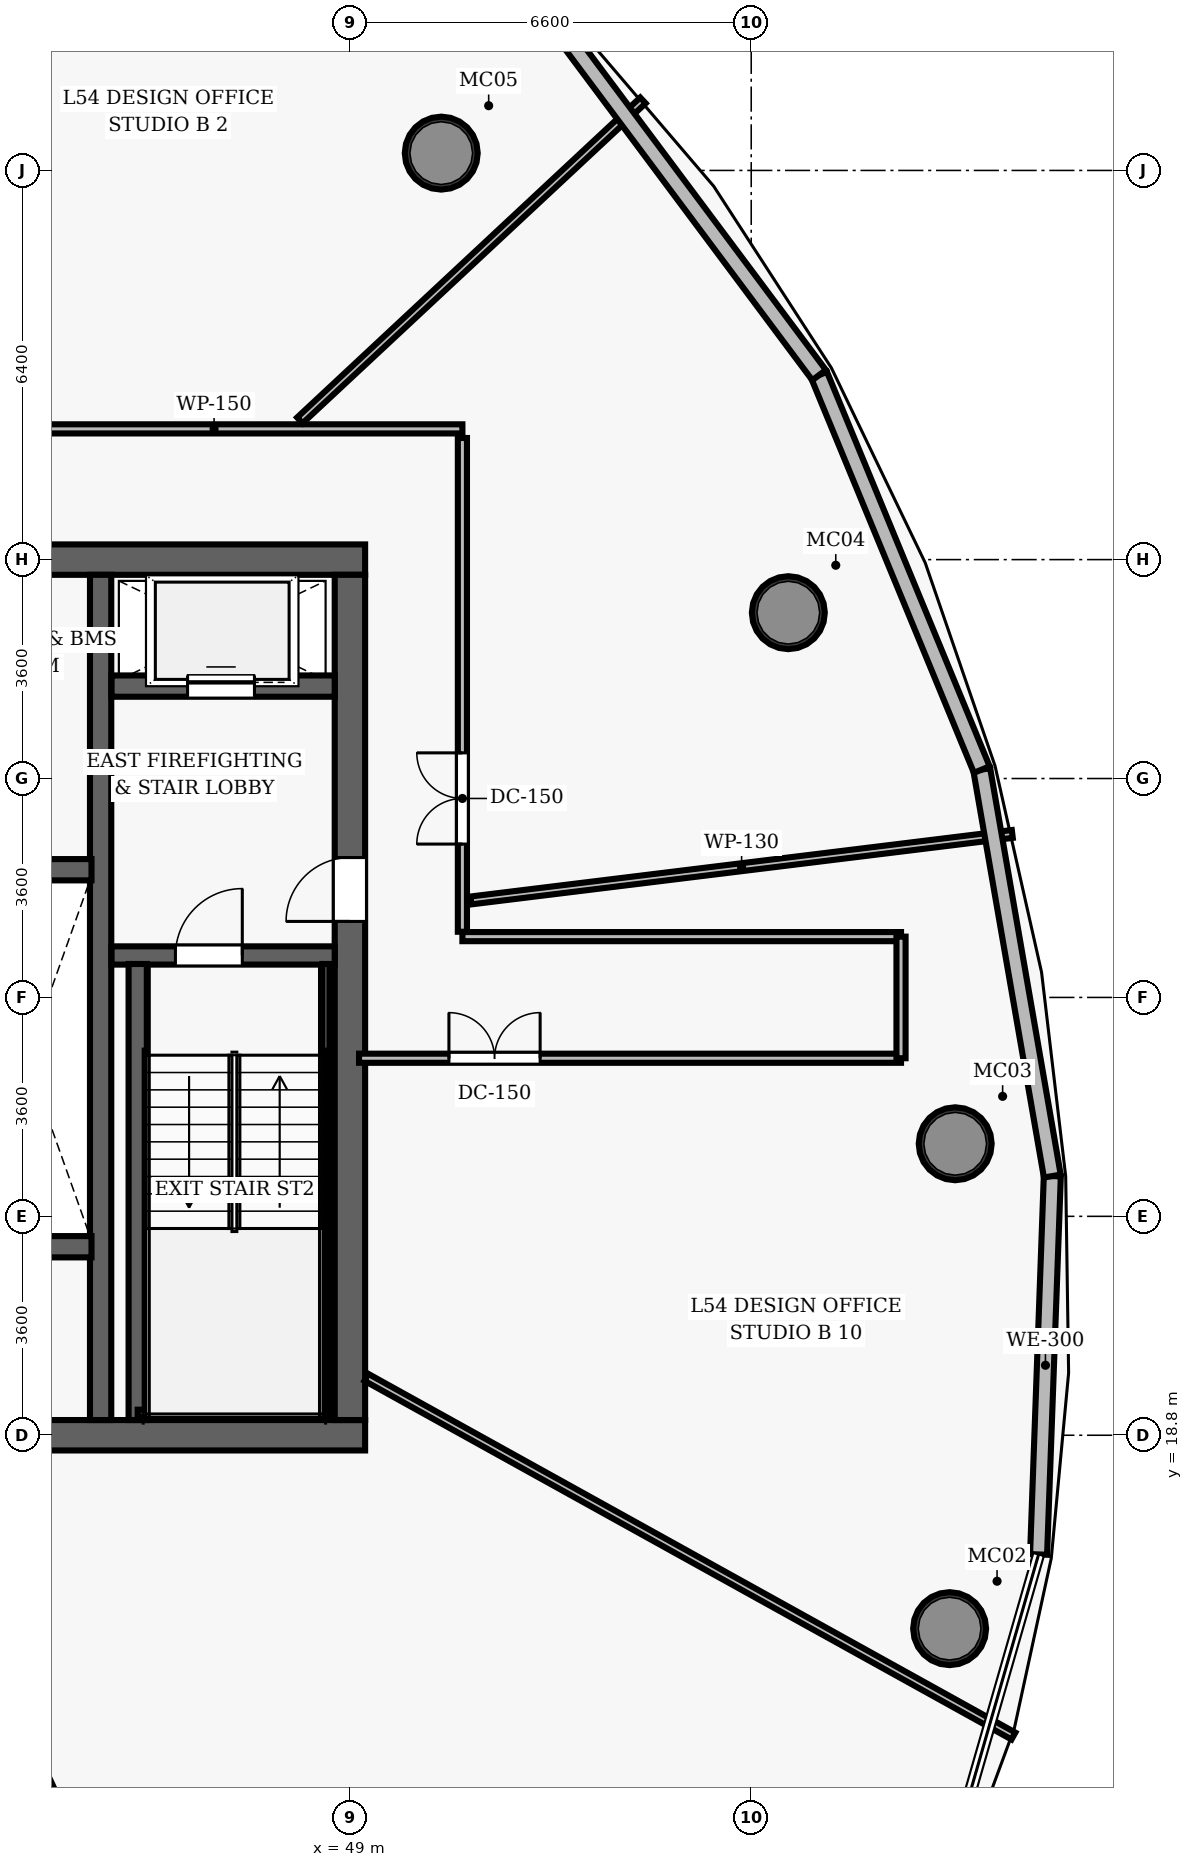
"""IFC4 building model, lengths in metres.
Left out: names, types, materials, properties, quantities, classifications, styles, units other than length and angle.
Written with IfcOpenShell. Run it as: python <this file> out.ifc"""

import sys

from ifc_helpers import new_model, si_unit, direction, frame, frame_2d, origin, origin_2d, place, context, subcontext, project, spatial, rectangle, hollow_circle, extrude, element, fill, save


model = new_model("IFC4")
c1 = context("Model", 3, precision=1e-05, world=origin(), true_north=direction((0.0, 1.0)))
c2 = subcontext(c1, "Body", "Model", "MODEL_VIEW")
j1 = project(units=[si_unit("LENGTHUNIT", "METRE"), si_unit("PLANEANGLEUNIT", "RADIAN")], contexts=[c1])
p1 = place(None, origin())
s1 = spatial("IfcSite", under=j1, at=p1, CompositionType="ELEMENT")
p2 = place(p1, origin())
s2 = spatial("IfcBuilding", under=s1, at=p2, CompositionType="ELEMENT")
p3 = place(p2, frame((0.0, 0.0, 213.55)))
s3 = spatial("IfcBuildingStorey", under=s2, at=p3, CompositionType="ELEMENT", Elevation=213.55)
p4 = place(p3, frame((26.75, 18.8, 0.0), z_axis=(0.0, 0.0, 1.0), x_axis=(1.0, 0.0, 0.0)))
e1 = element("IfcWall", 1, at=p4, inside=s3, PredefinedType="SHEAR", context=c2, shape_type="SweptSolid", body=[
    extrude(rectangle(XDim=22.5, YDim=0.5, at=frame_2d((11.25, 0.0))), origin(), (0.0, 0.0, 1.0), 3.85),
])
p5 = place(p4, frame((14.47, 0.0, 0.0)))
e2 = element("IfcOpeningElement", 2, at=p5, cuts=e1, PredefinedType="OPENING", context=c2, shape_type="SweptSolid", body=[
    extrude(rectangle(XDim=1.05, YDim=2.15, at=frame_2d((0.525, 1.075))), frame((0.0, 0.26, 0.0), z_axis=(0.0, -1.0, 0.0), x_axis=(1.0, 0.0, 0.0)), (0.0, 0.0, 1.0), 0.52),
])
p6 = place(p3, frame((26.75, 33.2, 0.0), z_axis=(0.0, 0.0, 1.0), x_axis=(1.0, 0.0, 0.0)))
e3 = element("IfcWall", 3, at=p6, inside=s3, PredefinedType="SHEAR", context=c2, shape_type="SweptSolid", body=[
    extrude(rectangle(XDim=22.5, YDim=0.5, at=frame_2d((11.25, 0.0))), origin(), (0.0, 0.0, 1.0), 3.85),
])
p7 = place(p6, frame((4.57, 0.0, 0.0)))
e4 = element("IfcOpeningElement", 4, at=p7, cuts=e3, PredefinedType="OPENING", context=c2, shape_type="SweptSolid", body=[
    extrude(rectangle(XDim=1.05, YDim=2.15, at=frame_2d((0.525, 1.075))), frame((0.0, 0.26, 0.0), z_axis=(0.0, -1.0, 0.0), x_axis=(1.0, 0.0, 0.0)), (0.0, 0.0, 1.0), 0.52),
])
p8 = place(p6, frame((14.47, 0.0, 0.0)))
e5 = element("IfcOpeningElement", 5, at=p8, cuts=e3, PredefinedType="OPENING", context=c2, shape_type="SweptSolid", body=[
    extrude(rectangle(XDim=1.05, YDim=2.15, at=frame_2d((0.525, 1.075))), frame((0.0, 0.26, 0.0), z_axis=(0.0, -1.0, 0.0), x_axis=(1.0, 0.0, 0.0)), (0.0, 0.0, 1.0), 0.52),
])
p9 = place(p3, frame((49.0, 19.05, 0.0), z_axis=(0.0, 0.0, 1.0), x_axis=(0.0, 1.0, 0.0)))
e6 = element("IfcWall", 6, at=p9, inside=s3, PredefinedType="SHEAR", context=c2, shape_type="SweptSolid", body=[
    extrude(rectangle(XDim=13.9, YDim=0.5, at=frame_2d((6.95, 0.0))), origin(), (0.0, 0.0, 1.0), 3.85),
])
p10 = place(p9, frame((8.2, 0.0, 0.0)))
e7 = element("IfcOpeningElement", 7, at=p10, cuts=e6, PredefinedType="OPENING", context=c2, shape_type="SweptSolid", body=[
    extrude(rectangle(XDim=1.05, YDim=2.15, at=frame_2d((0.525, 1.075))), frame((0.0, 0.26, 0.0), z_axis=(0.0, -1.0, 0.0), x_axis=(1.0, 0.0, 0.0)), (0.0, 0.0, 1.0), 0.52),
])
p11 = place(p3, frame((44.9, 19.05, 0.0), z_axis=(0.0, 0.0, 1.0), x_axis=(0.0, 1.0, 0.0)))
e8 = element("IfcWall", 8, at=p11, inside=s3, PredefinedType="SHEAR", context=c2, shape_type="SweptSolid", body=[
    extrude(rectangle(XDim=13.9, YDim=0.35, at=frame_2d((6.95, 0.0))), origin(), (0.0, 0.0, 1.0), 3.85),
])
for number, where, z_axis, x_axis in (
    (9, (58.863, 15.619, 0.0), (0.0, 0.0, 1.0), (1.0, 0.0, 0.0)),
    (10, (58.955, 23.594, 0.0), (0.0, 0.0, 1.0), (1.0, 0.0, 0.0)),
    (11, (56.21, 32.327, 0.0), (0.0, 0.0, 1.0), (1.0, 0.0, 0.0)),
    (12, (50.502, 39.885, 0.0), (0.0, 0.0, 1.0), (1.0, 0.0, 0.0)),
):
    element("IfcColumn", number, at=place(p3, frame(where, z_axis=z_axis, x_axis=x_axis)), inside=s3, PredefinedType="COLUMN", context=c2, shape_type="SweptSolid", body=[
        extrude(hollow_circle(Radius=0.6, WallThickness=0.05, at=origin_2d()), origin(), (0.0, 0.0, 1.0), 3.85),
    ])
p12 = place(p3, frame((45.08, 26.69, 0.0), z_axis=(0.0, 0.0, 1.0), x_axis=(1.0, 0.0, 0.0)))
e13 = element("IfcWall", 13, at=p12, inside=s3, PredefinedType="SHEAR", context=c2, shape_type="SweptSolid", body=[
    extrude(rectangle(XDim=3.67, YDim=0.3, at=frame_2d((1.835, 0.0))), origin(), (0.0, 0.0, 1.0), 3.85),
])
p13 = place(p12, frame((1.05, 0.0, 0.0)))
e14 = element("IfcOpeningElement", 14, at=p13, cuts=e13, PredefinedType="OPENING", context=c2, shape_type="SweptSolid", body=[
    extrude(rectangle(XDim=1.1, YDim=2.15, at=frame_2d((0.55, 1.075))), frame((0.0, 0.16, 0.0), z_axis=(0.0, -1.0, 0.0), x_axis=(1.0, 0.0, 0.0)), (0.0, 0.0, 1.0), 0.32),
])
p14 = place(p3, frame((45.51, 19.05, 0.0), z_axis=(0.0, 0.0, 1.0), x_axis=(0.0, 1.0, 0.0)))
e15 = element("IfcWall", 15, at=p14, inside=s3, PredefinedType="SHEAR", context=c2, shape_type="SweptSolid", body=[
    extrude(rectangle(XDim=7.5, YDim=0.3, at=frame_2d((3.75, 0.0))), origin(), (0.0, 0.0, 1.0), 3.85),
])
p15 = place(p3, frame((48.605, 19.1, 0.0), z_axis=(0.0, 0.0, 1.0), x_axis=(0.0, 1.0, 0.0)))
e16 = element("IfcWall", 16, at=p15, inside=s3, PredefinedType="SHEAR", context=c2, shape_type="SweptSolid", body=[
    extrude(rectangle(XDim=7.45, YDim=0.12, at=frame_2d((3.725, 0.0))), origin(), (0.0, 0.0, 1.0), 3.85),
])
p16 = place(p3, frame((45.51, 19.16, 0.0), z_axis=(0.0, 0.0, 1.0), x_axis=(1.0, 0.0, 0.0)))
e17 = element("IfcWall", 17, at=p16, inside=s3, PredefinedType="SHEAR", context=c2, shape_type="SweptSolid", body=[
    extrude(rectangle(XDim=3.095, YDim=0.12, at=frame_2d((1.547, 0.0))), origin(), (0.0, 0.0, 1.0), 3.85),
])
p17 = place(p3, frame((45.08, 31.12, 0.0), z_axis=(0.0, 0.0, 1.0), x_axis=(1.0, 0.0, 0.0)))
e18 = element("IfcWall", 18, at=p17, inside=s3, PredefinedType="SHEAR", context=c2, shape_type="SweptSolid", body=[
    extrude(rectangle(XDim=3.67, YDim=0.35, at=frame_2d((1.835, 0.0))), origin(), (0.0, 0.0, 1.0), 3.035),
])
p18 = place(p17, frame((1.25, 0.0, 0.0)))
e19 = element("IfcOpeningElement", 19, at=p18, cuts=e18, PredefinedType="OPENING", context=c2, shape_type="SweptSolid", body=[
    extrude(rectangle(XDim=1.1, YDim=2.15, at=frame_2d((0.55, 1.075))), frame((0.0, 0.185, 0.0), z_axis=(0.0, -1.0, 0.0), x_axis=(1.0, 0.0, 0.0)), (0.0, 0.0, 1.0), 0.37),
])
for number, where, z_axis, x_axis in (
    (20, (42.72, 21.9, 0.0), (0.0, 0.0, 1.0), (1.0, 0.0, 0.0)),
    (21, (42.72, 28.1, 0.0), (0.0, 0.0, 1.0), (1.0, 0.0, 0.0)),
):
    element("IfcWall", number, at=place(p3, frame(where, z_axis=z_axis, x_axis=x_axis)), inside=s3, PredefinedType="SHEAR", context=c2, shape_type="SweptSolid", body=[
        extrude(rectangle(XDim=2.03, YDim=0.35, at=frame_2d((1.015, 0.0))), origin(), (0.0, 0.0, 1.0), 3.035),
    ])
p19 = place(p3, frame((24.85, 35.35, 0.0), z_axis=(0.0, 0.0, 1.0), x_axis=(1.0, 0.0, 0.0)))
e22 = element("IfcWall", 22, at=p19, inside=s3, PredefinedType="PARTITIONING", context=c2, shape_type="SweptSolid", body=[
    extrude(rectangle(XDim=26.0, YDim=0.15, at=frame_2d((13.0, 0.0))), origin(), (0.0, 0.0, 1.0), 3.035),
])
p20 = place(p19, frame((16.182, 0.0, 0.0)))
e23 = element("IfcOpeningElement", 23, at=p20, cuts=e22, PredefinedType="OPENING", context=c2, shape_type="SweptSolid", body=[
    extrude(rectangle(XDim=1.5, YDim=2.2, at=frame_2d((0.75, 1.1))), frame((0.0, 0.085, 0.0), z_axis=(0.0, -1.0, 0.0), x_axis=(1.0, 0.0, 0.0)), (0.0, 0.0, 1.0), 0.17),
])
p21 = place(p19, frame((10.36, 0.0, 0.0)))
e24 = element("IfcOpeningElement", 24, at=p21, cuts=e22, PredefinedType="OPENING", context=c2, shape_type="SweptSolid", body=[
    extrude(rectangle(XDim=0.95, YDim=2.15, at=frame_2d((0.475, 1.075))), frame((0.0, 0.085, 0.0), z_axis=(0.0, -1.0, 0.0), x_axis=(1.0, 0.0, 0.0)), (0.0, 0.0, 1.0), 0.17),
])
p22 = place(p19, frame((6.298, 0.0, 0.0)))
e25 = element("IfcOpeningElement", 25, at=p22, cuts=e22, PredefinedType="OPENING", context=c2, shape_type="SweptSolid", body=[
    extrude(rectangle(XDim=0.95, YDim=2.15, at=frame_2d((0.475, 1.075))), frame((0.0, 0.085, 0.0), z_axis=(0.0, -1.0, 0.0), x_axis=(1.0, 0.0, 0.0)), (0.0, 0.0, 1.0), 0.17),
])
p23 = place(p3, frame((50.85, 27.08, 0.0), z_axis=(0.0, 0.0, 1.0), x_axis=(0.0, 1.0, 0.0)))
e26 = element("IfcWall", 26, at=p23, inside=s3, PredefinedType="PARTITIONING", context=c2, shape_type="SweptSolid", body=[
    extrude(rectangle(XDim=8.12, YDim=0.15, at=frame_2d((4.06, 0.0))), origin(), (0.0, 0.0, 1.0), 3.035),
])
p24 = place(p23, frame((1.442, 0.0, 0.0)))
e27 = element("IfcOpeningElement", 27, at=p24, cuts=e26, PredefinedType="OPENING", context=c2, shape_type="SweptSolid", body=[
    extrude(rectangle(XDim=1.5, YDim=2.2, at=frame_2d((0.75, 1.1))), frame((0.0, 0.085, 0.0), z_axis=(0.0, -1.0, 0.0), x_axis=(1.0, 0.0, 0.0)), (0.0, 0.0, 1.0), 0.17),
])
p25 = place(p3, frame((50.85, 27.0, 0.0), z_axis=(0.0, 0.0, 1.0), x_axis=(1.0, 0.0, 0.0)))
e28 = element("IfcWall", 28, at=p25, inside=s3, PredefinedType="PARTITIONING", context=c2, shape_type="SweptSolid", body=[
    extrude(rectangle(XDim=7.214, YDim=0.15, at=frame_2d((3.607, 0.0))), origin(), (0.0, 0.0, 1.0), 3.035),
])
p26 = place(p3, frame((49.15, 25.0, 0.0), z_axis=(0.0, 0.0, 1.0), x_axis=(1.0, 0.0, 0.0)))
e29 = element("IfcWall", 29, at=p26, inside=s3, PredefinedType="PARTITIONING", context=c2, shape_type="SweptSolid", body=[
    extrude(rectangle(XDim=8.914, YDim=0.15, at=frame_2d((4.457, 0.0))), origin(), (0.0, 0.0, 1.0), 3.035),
])
p27 = place(p26, frame((1.479, 0.0, 0.0)))
e30 = element("IfcOpeningElement", 30, at=p27, cuts=e29, PredefinedType="OPENING", context=c2, shape_type="SweptSolid", body=[
    extrude(rectangle(XDim=1.5, YDim=2.2, at=frame_2d((0.75, 1.1))), frame((0.0, 0.085, 0.0), z_axis=(0.0, -1.0, 0.0), x_axis=(1.0, 0.0, 0.0)), (0.0, 0.0, 1.0), 0.17),
])
p28 = place(p3, frame((58.064, 25.0, 0.0), z_axis=(0.0, 0.0, 1.0), x_axis=(0.0, 1.0, 0.0)))
e31 = element("IfcWall", 31, at=p28, inside=s3, PredefinedType="PARTITIONING", context=c2, shape_type="SweptSolid", body=[
    extrude(rectangle(XDim=2.0, YDim=0.15, at=frame_2d((1.0, 0.0))), origin(), (0.0, 0.0, 1.0), 3.035),
])
p29 = place(p3, frame((50.99, 27.595, 0.0), z_axis=(0.0, 0.0, 1.0), x_axis=(0.992545996706, 0.121870605244, 0.0)))
e32 = element("IfcWall", 32, at=p29, inside=s3, PredefinedType="PARTITIONING", context=c2, shape_type="SweptSolid", body=[
    extrude(rectangle(XDim=8.971, YDim=0.13, at=frame_2d((4.485, 0.0))), origin(), (0.0, 0.0, 1.0), 3.035),
])
p30 = place(p3, frame((48.177, 35.49, 0.0), z_axis=(0.0, 0.0, 1.0), x_axis=(0.731343539184, 0.682009257777, 0.0)))
e33 = element("IfcWall", 33, at=p30, inside=s3, PredefinedType="PARTITIONING", context=c2, shape_type="SweptSolid", body=[
    extrude(rectangle(XDim=7.715, YDim=0.13, at=frame_2d((3.857, 0.0))), origin(), (0.0, 0.0, 1.0), 3.035),
])
p31 = place(p3, frame((42.425, 16.51, 0.0), z_axis=(0.0, 0.0, 1.0), x_axis=(0.422623131255, -0.906305516329, 0.0)))
e34 = element("IfcWall", 34, at=p31, inside=s3, PredefinedType="PARTITIONING", context=c2, shape_type="SweptSolid", body=[
    extrude(rectangle(XDim=14.266, YDim=0.13, at=frame_2d((7.133, 0.0))), origin(), (0.0, 0.0, 1.0), 3.035),
])
p32 = place(p3, frame((49.27, 19.753, 0.0), z_axis=(0.0, 0.0, 1.0), x_axis=(0.874618736084, -0.484811372072, 0.0)))
e35 = element("IfcWall", 35, at=p32, inside=s3, PredefinedType="PARTITIONING", context=c2, shape_type="SweptSolid", body=[
    extrude(rectangle(XDim=12.168, YDim=0.13, at=frame_2d((6.084, 0.0))), origin(), (0.0, 0.0, 1.0), 3.035),
])
p33 = place(p3, frame((60.552, 23.062, 0.0), z_axis=(0.0, 0.0, 1.0), x_axis=(-0.036269133446, -0.999342058536, 0.0)))
e36 = element("IfcWall", 36, at=p33, inside=s3, PredefinedType="SOLIDWALL", context=c2, shape_type="SweptSolid", body=[
    extrude(rectangle(XDim=6.227, YDim=0.28, at=frame_2d((3.113, 0.0))), origin(), (0.0, 0.0, 1.0), 3.62),
])
p34 = place(p3, frame((59.392, 29.747, 0.0), z_axis=(0.0, 0.0, 1.0), x_axis=(0.171035922685, -0.985264793419, 0.0)))
e37 = element("IfcWall", 37, at=p34, inside=s3, PredefinedType="SOLIDWALL", context=c2, shape_type="SweptSolid", body=[
    extrude(rectangle(XDim=6.784, YDim=0.28, at=frame_2d((3.392, 0.0))), origin(), (0.0, 0.0, 1.0), 3.62),
])
p35 = place(p3, frame((56.716, 36.234, 0.0), z_axis=(0.0, 0.0, 1.0), x_axis=(0.381230949434, -0.924479833849, 0.0)))
e38 = element("IfcWall", 38, at=p35, inside=s3, PredefinedType="SOLIDWALL", context=c2, shape_type="SweptSolid", body=[
    extrude(rectangle(XDim=7.018, YDim=0.28, at=frame_2d((3.509, 0.0))), origin(), (0.0, 0.0, 1.0), 3.62),
])
p36 = place(p3, frame((52.5, 41.879, 0.0), z_axis=(0.0, 0.0, 1.0), x_axis=(0.598368729924, -0.801220857847, 0.0)))
e39 = element("IfcWall", 39, at=p36, inside=s3, PredefinedType="SOLIDWALL", context=c2, shape_type="SweptSolid", body=[
    extrude(rectangle(XDim=7.045, YDim=0.28, at=frame_2d((3.523, 0.0))), origin(), (0.0, 0.0, 1.0), 3.62),
])
p37 = place(p13, origin())
e40 = element("IfcDoor", 40, at=p37, inside=s3, OperationType="SINGLE_SWING_RIGHT", PredefinedType="DOOR", context=c2, shape_type="SweptSolid", body=[
    extrude(rectangle(XDim=1.1, YDim=2.15, at=frame_2d((0.55, 1.075))), frame((0.0, 0.025, 0.0), z_axis=(0.0, -1.0, 0.0), x_axis=(1.0, 0.0, 0.0)), (0.0, 0.0, 1.0), 0.05),
])
fill(e14, e40)
p38 = place(p10, origin())
e41 = element("IfcDoor", 41, at=p38, inside=s3, OperationType="SINGLE_SWING_LEFT", PredefinedType="DOOR", context=c2, shape_type="SweptSolid", body=[
    extrude(rectangle(XDim=1.05, YDim=2.15, at=frame_2d((0.525, 1.075))), frame((0.0, 0.025, 0.0), z_axis=(0.0, -1.0, 0.0), x_axis=(1.0, 0.0, 0.0)), (0.0, 0.0, 1.0), 0.05),
])
fill(e7, e41)
p39 = place(p24, origin())
e42 = element("IfcDoor", 42, at=p39, inside=s3, OperationType="DOUBLE_DOOR_SINGLE_SWING", PredefinedType="DOOR", context=c2, shape_type="SweptSolid", body=[
    extrude(rectangle(XDim=1.5, YDim=2.2, at=frame_2d((0.75, 1.1))), frame((0.0, 0.025, 0.0), z_axis=(0.0, -1.0, 0.0), x_axis=(1.0, 0.0, 0.0)), (0.0, 0.0, 1.0), 0.05),
])
fill(e27, e42)
p40 = place(p27, origin())
e43 = element("IfcDoor", 43, at=p40, inside=s3, OperationType="DOUBLE_DOOR_SINGLE_SWING", PredefinedType="DOOR", context=c2, shape_type="SweptSolid", body=[
    extrude(rectangle(XDim=1.5, YDim=2.2, at=frame_2d((0.75, 1.1))), frame((0.0, 0.025, 0.0), z_axis=(0.0, -1.0, 0.0), x_axis=(1.0, 0.0, 0.0)), (0.0, 0.0, 1.0), 0.05),
])
fill(e30, e43)
p41 = place(p18, origin())
e44 = element("IfcDoor", 44, at=p41, inside=s3, OperationType="SLIDING_TO_LEFT", PredefinedType="DOOR", context=c2, shape_type="SweptSolid", body=[
    extrude(rectangle(XDim=1.1, YDim=2.15, at=frame_2d((0.55, 1.075))), frame((0.0, 0.025, 0.0), z_axis=(0.0, -1.0, 0.0), x_axis=(1.0, 0.0, 0.0)), (0.0, 0.0, 1.0), 0.05),
])
fill(e19, e44)
save(model, sys.argv[1])
